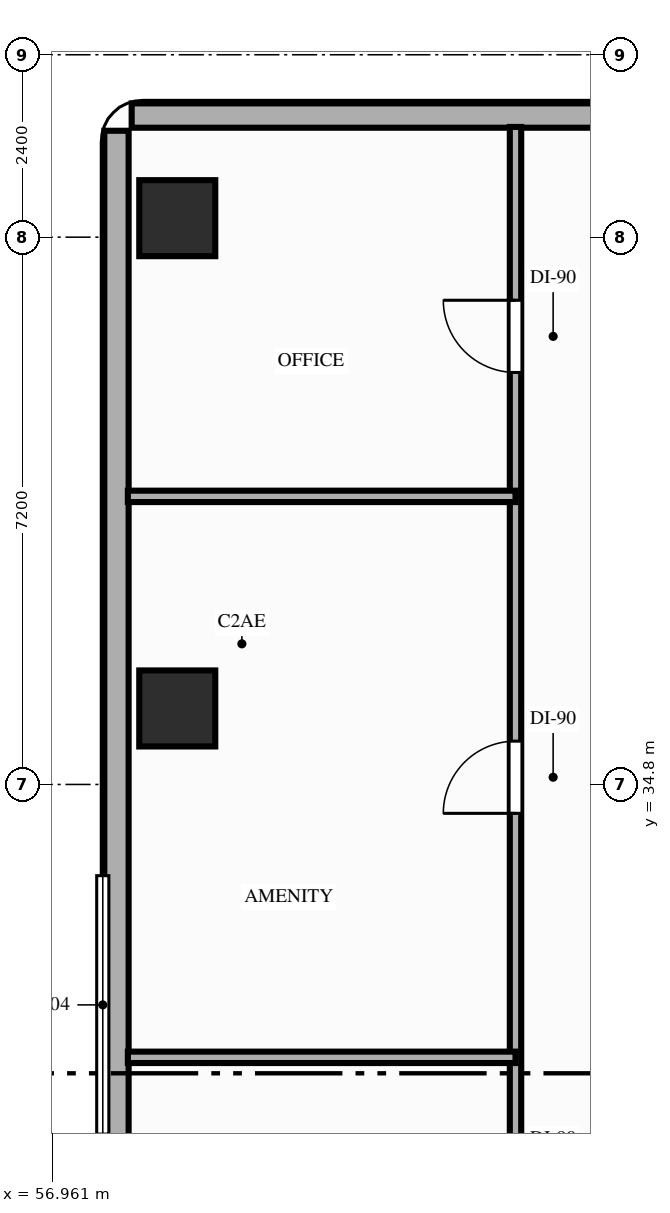
"""IFC4 building model, lengths in metres.
Left out: names, types, materials, properties, quantities, classifications, styles, units other than length and angle.
Written with IfcOpenShell. Run it as: python <this file> out.ifc"""

import sys

from ifc_helpers import new_model, si_unit, direction, frame, frame_2d, origin, origin_2d, place, context, subcontext, project, spatial, rectangle, extrude, element, fill, save


model = new_model("IFC4")
c1 = context("Model", 3, precision=1e-05, world=origin(), true_north=direction((0.0, 1.0)))
c2 = subcontext(c1, "Body", "Model", "MODEL_VIEW")
j1 = project(units=[si_unit("LENGTHUNIT", "METRE"), si_unit("PLANEANGLEUNIT", "RADIAN")], contexts=[c1])
p1 = place(None, origin())
s1 = spatial("IfcSite", under=j1, at=p1, CompositionType="ELEMENT")
p2 = place(p1, origin())
s2 = spatial("IfcBuilding", under=s1, at=p2, CompositionType="ELEMENT")
p3 = place(p2, frame((0.0, 0.0, 33.4)))
s3 = spatial("IfcBuildingStorey", under=s2, at=p3, CompositionType="ELEMENT", Elevation=33.4)
for number, where, z_axis, x_axis in (
    (1, (58.6, 35.8, 0.0), (0.0, 0.0, 1.0), (1.0, 0.0, 0.0)),
    (2, (58.6, 42.25, 0.0), (0.0, 0.0, 1.0), (1.0, 0.0, 0.0)),
):
    element("IfcColumn", number, at=place(p3, frame(where, z_axis=z_axis, x_axis=x_axis)), inside=s3, PredefinedType="COLUMN", context=c2, shape_type="SweptSolid", body=[
        extrude(rectangle(XDim=1.0, YDim=1.0, at=origin_2d()), origin(), (0.0, 0.0, 1.0), 3.2),
    ])
p4 = place(p3, frame((57.8, 43.4, 0.0), z_axis=(0.0, 0.0, 1.0), x_axis=(0.0, -1.0, 0.0)))
e3 = element("IfcWall", 3, at=p4, inside=s3, PredefinedType="STANDARD", context=c2, shape_type="SweptSolid", body=[
    extrude(rectangle(XDim=22.6, YDim=0.32, at=frame_2d((11.3, 0.0))), origin(), (0.0, 0.0, 1.0), 2.51),
])
p5 = place(p3, frame((72.8, 43.6, 0.0), z_axis=(0.0, 0.0, 1.0), x_axis=(-1.0, 0.0, 0.0)))
e4 = element("IfcWall", 4, at=p5, inside=s3, PredefinedType="STANDARD", context=c2, shape_type="SweptSolid", body=[
    extrude(rectangle(XDim=14.8, YDim=0.32, at=frame_2d((7.4, 0.0))), origin(), (0.0, 0.0, 1.0), 3.02),
])
p6 = place(p3, frame((63.05, 20.75, 0.0), z_axis=(0.0, 0.0, 1.0), x_axis=(0.0, 1.0, 0.0)))
e5 = element("IfcWall", 5, at=p6, inside=s3, PredefinedType="PARTITIONING", context=c2, shape_type="SweptSolid", body=[
    extrude(rectangle(XDim=22.7, YDim=0.15, at=frame_2d((11.35, 0.0))), origin(), (0.0, 0.0, 1.0), 2.51),
])
p7 = place(p6, frame((0.73, 0.0, 0.0)))
e6 = element("IfcOpeningElement", 6, at=p7, cuts=e5, PredefinedType="OPENING", context=c2, shape_type="SweptSolid", body=[
    extrude(rectangle(XDim=0.85, YDim=2.1, at=frame_2d((0.425, 1.05))), frame((0.0, 0.085, 0.0), z_axis=(0.0, -1.0, 0.0), x_axis=(1.0, 0.0, 0.0)), (0.0, 0.0, 1.0), 0.17),
])
p8 = place(p6, frame((3.43, 0.0, 0.0)))
e7 = element("IfcOpeningElement", 7, at=p8, cuts=e5, PredefinedType="OPENING", context=c2, shape_type="SweptSolid", body=[
    extrude(rectangle(XDim=0.95, YDim=2.1, at=frame_2d((0.475, 1.05))), frame((0.0, 0.085, 0.0), z_axis=(0.0, -1.0, 0.0), x_axis=(1.0, 0.0, 0.0)), (0.0, 0.0, 1.0), 0.17),
])
p9 = place(p6, frame((8.15, 0.0, 0.0)))
e8 = element("IfcOpeningElement", 8, at=p9, cuts=e5, PredefinedType="OPENING", context=c2, shape_type="SweptSolid", body=[
    extrude(rectangle(XDim=0.95, YDim=2.15, at=frame_2d((0.475, 1.075))), frame((0.0, 0.085, 0.0), z_axis=(0.0, -1.0, 0.0), x_axis=(1.0, 0.0, 0.0)), (0.0, 0.0, 1.0), 0.17),
])
p10 = place(p6, frame((13.67, 0.0, 0.0)))
e9 = element("IfcOpeningElement", 9, at=p10, cuts=e5, PredefinedType="OPENING", context=c2, shape_type="SweptSolid", body=[
    extrude(rectangle(XDim=0.95, YDim=2.15, at=frame_2d((0.475, 1.075))), frame((0.0, 0.085, 0.0), z_axis=(0.0, -1.0, 0.0), x_axis=(1.0, 0.0, 0.0)), (0.0, 0.0, 1.0), 0.17),
])
p11 = place(p6, frame((19.47, 0.0, 0.0)))
e10 = element("IfcOpeningElement", 10, at=p11, cuts=e5, PredefinedType="OPENING", context=c2, shape_type="SweptSolid", body=[
    extrude(rectangle(XDim=0.95, YDim=2.15, at=frame_2d((0.475, 1.075))), frame((0.0, 0.085, 0.0), z_axis=(0.0, -1.0, 0.0), x_axis=(1.0, 0.0, 0.0)), (0.0, 0.0, 1.0), 0.17),
])
for number, where, z_axis, x_axis in (
    (11, (57.95, 31.21, 0.0), (0.0, 0.0, 1.0), (1.0, 0.0, 0.0)),
    (12, (57.95, 38.59, 0.0), (0.0, 0.0, 1.0), (1.0, 0.0, 0.0)),
):
    element("IfcWall", number, at=place(p3, frame(where, z_axis=z_axis, x_axis=x_axis)), inside=s3, PredefinedType="PARTITIONING", context=c2, shape_type="SweptSolid", body=[
        extrude(rectangle(XDim=5.1, YDim=0.15, at=frame_2d((2.55, 0.0))), origin(), (0.0, 0.0, 1.0), 2.51),
    ])
p12 = place(p10, origin())
e13 = element("IfcDoor", 13, at=p12, inside=s3, OperationType="SINGLE_SWING_LEFT", PredefinedType="DOOR", context=c2, shape_type="SweptSolid", body=[
    extrude(rectangle(XDim=0.95, YDim=2.15, at=frame_2d((0.475, 1.075))), frame((0.0, 0.025, 0.0), z_axis=(0.0, -1.0, 0.0), x_axis=(1.0, 0.0, 0.0)), (0.0, 0.0, 1.0), 0.05),
])
fill(e9, e13)
p13 = place(p11, origin())
e14 = element("IfcDoor", 14, at=p13, inside=s3, OperationType="SINGLE_SWING_RIGHT", PredefinedType="DOOR", context=c2, shape_type="SweptSolid", body=[
    extrude(rectangle(XDim=0.95, YDim=2.15, at=frame_2d((0.475, 1.075))), frame((0.0, 0.025, 0.0), z_axis=(0.0, -1.0, 0.0), x_axis=(1.0, 0.0, 0.0)), (0.0, 0.0, 1.0), 0.05),
])
fill(e10, e14)
save(model, sys.argv[1])
